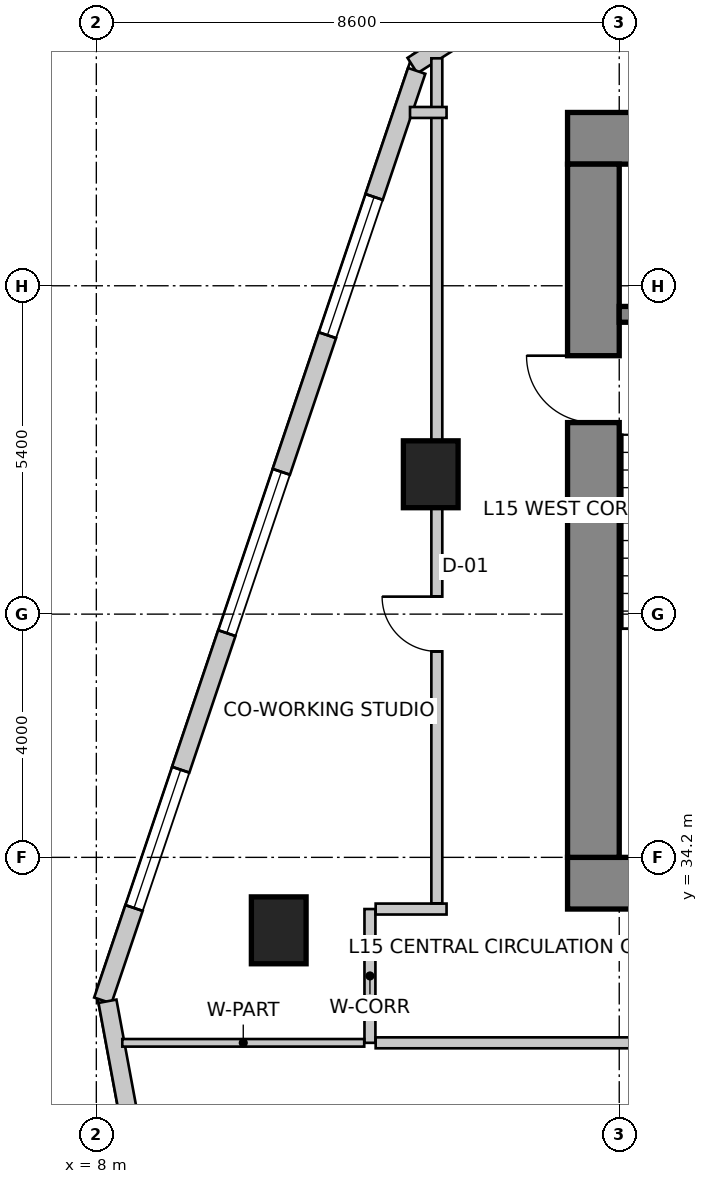
"""IFC4 building model, lengths in metres.
Left out: names, types, materials, properties, quantities, classifications, styles, units other than length and angle.
Written with IfcOpenShell. Run it as: python <this file> out.ifc"""

import sys

from ifc_helpers import new_model, si_unit, direction, frame, frame_2d, origin, origin_2d, place, context, subcontext, project, spatial, rectangle, extrude, source, transform, mapped, element, fill, save


model = new_model("IFC4")
c1 = context("Model", 3, precision=1e-05, world=origin(), true_north=direction((0.0, 1.0)))
c2 = subcontext(c1, "Body", "Model", "MODEL_VIEW")
j1 = project(units=[si_unit("LENGTHUNIT", "METRE"), si_unit("PLANEANGLEUNIT", "RADIAN")], contexts=[c1])
p1 = place(None, origin())
s1 = spatial("IfcSite", under=j1, at=p1, CompositionType="ELEMENT")
p2 = place(p1, origin())
s2 = spatial("IfcBuilding", under=s1, at=p2, CompositionType="ELEMENT")
p3 = place(p2, frame((0.0, 0.0, 63.0)))
s3 = spatial("IfcBuildingStorey", under=s2, at=p3, CompositionType="ELEMENT", Elevation=63.0)
p4 = place(p3, frame((15.75, 46.025, 0.0), z_axis=(0.0, 0.0, 1.0), x_axis=(1.0, 0.0, 0.0)))
e1 = element("IfcWall", 1, at=p4, inside=s3, PredefinedType="SHEAR", context=c2, shape_type="SweptSolid", body=[
    extrude(rectangle(XDim=16.1, YDim=0.85, at=frame_2d((8.05, 0.0))), origin(), (0.0, 0.0, 1.0), 4.0),
])
p5 = place(p3, frame((15.75, 33.775, 0.0), z_axis=(0.0, 0.0, 1.0), x_axis=(1.0, 0.0, 0.0)))
e2 = element("IfcWall", 2, at=p5, inside=s3, PredefinedType="SHEAR", context=c2, shape_type="SweptSolid", body=[
    extrude(rectangle(XDim=16.1, YDim=0.85, at=frame_2d((8.05, 0.0))), origin(), (0.0, 0.0, 1.0), 4.0),
])
m1 = source(origin(), c2, "Body", "SweptSolid", [
    extrude(rectangle(XDim=1.3, YDim=2.15, at=frame_2d((0.65, 1.075))), frame((0.0, 0.435, 0.0), z_axis=(0.0, -1.0, 0.0), x_axis=(1.0, 0.0, 0.0)), (0.0, 0.0, 1.0), 0.87),
])
p6 = place(p5, frame((10.18, 0.0, 0.0)))
e3 = element("IfcOpeningElement", 3, at=p6, cuts=e2, PredefinedType="OPENING", context=c2, shape_type="MappedRepresentation", body=[
    mapped(m1, transform((0.0, 0.0, 0.0), scale=1.0)),
])
p7 = place(p3, frame((16.175, 34.2, 0.0), z_axis=(0.0, 0.0, 1.0), x_axis=(0.0, 1.0, 0.0)))
e4 = element("IfcWall", 4, at=p7, inside=s3, PredefinedType="SHEAR", context=c2, shape_type="SweptSolid", body=[
    extrude(rectangle(XDim=11.4, YDim=0.85, at=frame_2d((5.7, 0.0))), origin(), (0.0, 0.0, 1.0), 4.0),
])
m2 = source(origin(), c2, "Body", "SweptSolid", [
    extrude(rectangle(XDim=1.1, YDim=2.15, at=frame_2d((0.55, 1.075))), frame((0.0, 0.435, 0.0), z_axis=(0.0, -1.0, 0.0), x_axis=(1.0, 0.0, 0.0)), (0.0, 0.0, 1.0), 0.87),
])
p8 = place(p7, frame((7.15, 0.0, 0.0)))
e5 = element("IfcOpeningElement", 5, at=p8, cuts=e4, PredefinedType="OPENING", context=c2, shape_type="MappedRepresentation", body=[
    mapped(m2, transform((0.0, 0.0, 0.0), scale=1.0)),
])
p9 = place(p3, frame((16.6, 43.13, 0.0), z_axis=(0.0, 0.0, 1.0), x_axis=(1.0, 0.0, 0.0)))
e6 = element("IfcWall", 6, at=p9, inside=s3, PredefinedType="SHEAR", context=c2, shape_type="SweptSolid", body=[
    extrude(rectangle(XDim=3.5, YDim=0.26, at=frame_2d((1.75, 0.0))), origin(), (0.0, 0.0, 1.0), 4.0),
])
m3 = source(origin(), c2, "Body", "SweptSolid", [
    extrude(rectangle(XDim=0.9, YDim=1.1, at=origin_2d()), origin(), (0.0, 0.0, 1.0), 4.0),
])
for number, where, z_axis, x_axis in (
    (7, (11.0, 33.0, 0.0), (0.0, 0.0, 1.0), (1.0, 0.0, 0.0)),
    (8, (13.5, 40.5, 0.0), (0.0, 0.0, 1.0), (1.0, 0.0, 0.0)),
):
    element("IfcColumn", number, at=place(p3, frame(where, z_axis=z_axis, x_axis=x_axis)), inside=s3, PredefinedType="COLUMN", context=c2, shape_type="MappedRepresentation", body=[
        mapped(m3, transform((0.0, 0.0, 0.0), scale=1.0)),
    ])
p10 = place(p3, frame((21.875, 52.742, 0.0), z_axis=(0.0, 0.0, 1.0), x_axis=(-0.843662465249, -0.536873956092, 0.0)))
e9 = element("IfcWall", 9, at=p10, inside=s3, PredefinedType="SOLIDWALL", context=c2, shape_type="SweptSolid", body=[
    extrude(rectangle(XDim=10.284, YDim=0.3, at=frame_2d((5.142, 0.0))), origin(), (0.0, 0.0, 1.0), 3.75),
])
m4 = source(origin(), c2, "Body", "SweptSolid", [
    extrude(rectangle(XDim=1.2, YDim=1.6, at=frame_2d((0.6, 0.8))), frame((0.0, 0.16, 0.0), z_axis=(0.0, -1.0, 0.0), x_axis=(1.0, 0.0, 0.0)), (0.0, 0.0, 1.0), 0.32),
])
p11 = place(p10, frame((0.479, 0.0, 0.85)))
e10 = element("IfcOpeningElement", 10, at=p11, cuts=e9, PredefinedType="OPENING", context=c2, shape_type="MappedRepresentation", body=[
    mapped(m4, transform((0.0, 0.0, 0.0), scale=1.0)),
])
m5 = source(origin(), c2, "Body", "SweptSolid", [
    extrude(rectangle(XDim=2.8, YDim=2.4, at=frame_2d((1.4, 1.2))), frame((0.0, 0.16, 0.0), z_axis=(0.0, -1.0, 0.0), x_axis=(1.0, 0.0, 0.0)), (0.0, 0.0, 1.0), 0.32),
])
p12 = place(p10, frame((3.342, 0.0, 0.85)))
e11 = element("IfcOpeningElement", 11, at=p12, cuts=e9, PredefinedType="OPENING", context=c2, shape_type="MappedRepresentation", body=[
    mapped(m5, transform((0.0, 0.0, 0.0), scale=1.0)),
])
m6 = source(origin(), c2, "Body", "SweptSolid", [
    extrude(rectangle(XDim=1.8, YDim=2.1, at=frame_2d((0.9, 1.05))), frame((0.0, 0.16, 0.0), z_axis=(0.0, -1.0, 0.0), x_axis=(1.0, 0.0, 0.0)), (0.0, 0.0, 1.0), 0.32),
])
p13 = place(p10, frame((7.753, 0.0, 0.85)))
e12 = element("IfcOpeningElement", 12, at=p13, cuts=e9, PredefinedType="OPENING", context=c2, shape_type="MappedRepresentation", body=[
    mapped(m6, transform((0.0, 0.0, 0.0), scale=1.0)),
])
p14 = place(p3, frame((13.269, 47.134, 0.0), z_axis=(0.0, 0.0, 1.0), x_axis=(-0.319920423265, -0.947444416722, 0.0)))
e13 = element("IfcWall", 13, at=p14, inside=s3, PredefinedType="SOLIDWALL", context=c2, shape_type="SweptSolid", body=[
    extrude(rectangle(XDim=16.135, YDim=0.3, at=frame_2d((8.067, 0.0))), origin(), (0.0, 0.0, 1.0), 3.75),
])
m7 = source(origin(), c2, "Body", "SweptSolid", [
    extrude(rectangle(XDim=2.4, YDim=2.2, at=frame_2d((1.2, 1.1))), frame((0.0, 0.16, 0.0), z_axis=(0.0, -1.0, 0.0), x_axis=(1.0, 0.0, 0.0)), (0.0, 0.0, 1.0), 0.32),
])
p15 = place(p14, frame((2.188, 0.0, 0.85)))
e14 = element("IfcOpeningElement", 14, at=p15, cuts=e13, PredefinedType="OPENING", context=c2, shape_type="MappedRepresentation", body=[
    mapped(m7, transform((0.0, 0.0, 0.0), scale=1.0)),
])
p16 = place(p14, frame((6.959, 0.0, 0.85)))
e15 = element("IfcOpeningElement", 15, at=p16, cuts=e13, PredefinedType="OPENING", context=c2, shape_type="MappedRepresentation", body=[
    mapped(m5, transform((0.0, 0.0, 0.0), scale=1.0)),
])
p17 = place(p14, frame((12.13, 0.0, 0.85)))
e16 = element("IfcOpeningElement", 16, at=p17, cuts=e13, PredefinedType="OPENING", context=c2, shape_type="MappedRepresentation", body=[
    mapped(m7, transform((0.0, 0.0, 0.0), scale=1.0)),
])
p18 = place(p3, frame((8.183, 31.833, 0.0), z_axis=(0.0, 0.0, 1.0), x_axis=(0.18216364648, -0.983268226834, 0.0)))
e17 = element("IfcWall", 17, at=p18, inside=s3, PredefinedType="SOLIDWALL", context=c2, shape_type="SweptSolid", body=[
    extrude(rectangle(XDim=26.678, YDim=0.3, at=frame_2d((13.339, 0.0))), origin(), (0.0, 0.0, 1.0), 3.75),
])
m8 = source(origin(), c2, "Body", "SweptSolid", [
    extrude(rectangle(XDim=1.6, YDim=2.15, at=frame_2d((0.8, 1.075))), frame((0.0, 0.16, 0.0), z_axis=(0.0, -1.0, 0.0), x_axis=(1.0, 0.0, 0.0)), (0.0, 0.0, 1.0), 0.32),
])
p19 = place(p18, frame((9.427, 0.0, 0.0)))
e18 = element("IfcOpeningElement", 18, at=p19, cuts=e17, PredefinedType="OPENING", context=c2, shape_type="MappedRepresentation", body=[
    mapped(m8, transform((0.0, 0.0, 0.0), scale=1.0)),
])
p20 = place(p18, frame((3.642, 0.0, 0.85)))
e19 = element("IfcOpeningElement", 19, at=p20, cuts=e17, PredefinedType="OPENING", context=c2, shape_type="MappedRepresentation", body=[
    mapped(m5, transform((0.0, 0.0, 0.0), scale=1.0)),
])
p21 = place(p18, frame((13.647, 0.0, 0.85)))
e20 = element("IfcOpeningElement", 20, at=p21, cuts=e17, PredefinedType="OPENING", context=c2, shape_type="MappedRepresentation", body=[
    mapped(m5, transform((0.0, 0.0, 0.0), scale=1.0)),
])
p22 = place(p18, frame((18.372, 0.0, 0.85)))
e21 = element("IfcOpeningElement", 21, at=p22, cuts=e17, PredefinedType="OPENING", context=c2, shape_type="MappedRepresentation", body=[
    mapped(m7, transform((0.0, 0.0, 0.0), scale=1.0)),
])
p23 = place(p18, frame((22.696, 0.0, 0.85)))
e22 = element("IfcOpeningElement", 22, at=p23, cuts=e17, PredefinedType="OPENING", context=c2, shape_type="MappedRepresentation", body=[
    mapped(m5, transform((0.0, 0.0, 0.0), scale=1.0)),
])
p24 = place(p3, frame((12.5, 31.15, 0.0), z_axis=(0.0, 0.0, 1.0), x_axis=(0.0, 1.0, 0.0)))
e23 = element("IfcWall", 23, at=p24, inside=s3, PredefinedType="PARTITIONING", context=c2, shape_type="SweptSolid", body=[
    extrude(rectangle(XDim=2.2, YDim=0.18, at=frame_2d((1.1, 0.0))), origin(), (0.0, 0.0, 1.0), 3.335),
])
p25 = place(p3, frame((12.594, 33.35, 0.0), z_axis=(0.0, 0.0, 1.0), x_axis=(1.0, 0.0, 0.0)))
e24 = element("IfcWall", 24, at=p25, inside=s3, PredefinedType="PARTITIONING", context=c2, shape_type="SweptSolid", body=[
    extrude(rectangle(XDim=1.166, YDim=0.18, at=frame_2d((0.583, 0.0))), origin(), (0.0, 0.0, 1.0), 3.75),
])
p26 = place(p3, frame((26.76, 31.15, 0.0), z_axis=(0.0, 0.0, 1.0), x_axis=(-1.0, 0.0, 0.0)))
e25 = element("IfcWall", 25, at=p26, inside=s3, PredefinedType="PARTITIONING", context=c2, shape_type="SweptSolid", body=[
    extrude(rectangle(XDim=14.166, YDim=0.18, at=frame_2d((7.083, 0.0))), origin(), (0.0, 0.0, 1.0), 3.335),
])
m9 = source(origin(), c2, "Body", "SweptSolid", [
    extrude(rectangle(XDim=1.4, YDim=2.15, at=frame_2d((0.7, 1.075))), frame((0.0, 0.1, 0.0), z_axis=(0.0, -1.0, 0.0), x_axis=(1.0, 0.0, 0.0)), (0.0, 0.0, 1.0), 0.2),
])
p27 = place(p26, frame((6.323, 0.0, 0.0)))
e26 = element("IfcOpeningElement", 26, at=p27, cuts=e25, PredefinedType="OPENING", context=c2, shape_type="MappedRepresentation", body=[
    mapped(m9, transform((0.0, 0.0, 0.0), scale=1.0)),
])
p28 = place(p3, frame((13.6, 33.444, 0.0), z_axis=(0.0, 0.0, 1.0), x_axis=(0.0, 1.0, 0.0)))
e27 = element("IfcWall", 27, at=p28, inside=s3, PredefinedType="PARTITIONING", context=c2, shape_type="SweptSolid", body=[
    extrude(rectangle(XDim=13.896, YDim=0.18, at=frame_2d((6.948, 0.0))), origin(), (0.0, 0.0, 1.0), 2.892),
])
m10 = source(origin(), c2, "Body", "SweptSolid", [
    extrude(rectangle(XDim=0.9, YDim=2.15, at=frame_2d((0.45, 1.075))), frame((0.0, 0.1, 0.0), z_axis=(0.0, -1.0, 0.0), x_axis=(1.0, 0.0, 0.0)), (0.0, 0.0, 1.0), 0.2),
])
p29 = place(p28, frame((4.144, 0.0, 0.0)))
e28 = element("IfcOpeningElement", 28, at=p29, cuts=e27, PredefinedType="OPENING", context=c2, shape_type="MappedRepresentation", body=[
    mapped(m10, transform((0.0, 0.0, 0.0), scale=1.0)),
])
p30 = place(p3, frame((13.76, 46.45, 0.0), z_axis=(0.0, 0.0, 1.0), x_axis=(-1.0, 0.0, 0.0)))
e29 = element("IfcWall", 29, at=p30, inside=s3, PredefinedType="PARTITIONING", context=c2, shape_type="SweptSolid", body=[
    extrude(rectangle(XDim=0.601, YDim=0.18, at=frame_2d((0.301, 0.0))), origin(), (0.0, 0.0, 1.0), 3.75),
])
p31 = place(p3, frame((12.406, 31.15, 0.0), z_axis=(0.0, 0.0, 1.0), x_axis=(-1.0, 0.0, 0.0)))
e30 = element("IfcWall", 30, at=p31, inside=s3, PredefinedType="PARTITIONING", context=c2, shape_type="SweptSolid", body=[
    extrude(rectangle(XDim=3.979, YDim=0.125, at=frame_2d((1.99, 0.0))), origin(), (0.0, 0.0, 1.0), 2.892),
])
m11 = source(origin(), c2, "Body", "SweptSolid", [
    extrude(rectangle(XDim=2.4, YDim=2.2, at=frame_2d((1.2, 1.1))), frame((0.0, -0.015, 0.0), z_axis=(0.0, -1.0, 0.0), x_axis=(1.0, 0.0, 0.0)), (0.0, 0.0, 1.0), 0.06),
])
p32 = place(p15, origin())
e31 = element("IfcWindow", 31, at=p32, inside=s3, PartitioningType="SINGLE_PANEL", PredefinedType="WINDOW", context=c2, shape_type="MappedRepresentation", body=[
    mapped(m11, transform((0.0, 0.0, 0.0), scale=1.0)),
])
fill(e14, e31)
m12 = source(origin(), c2, "Body", "SweptSolid", [
    extrude(rectangle(XDim=2.8, YDim=2.4, at=frame_2d((1.4, 1.2))), frame((0.0, -0.015, 0.0), z_axis=(0.0, -1.0, 0.0), x_axis=(1.0, 0.0, 0.0)), (0.0, 0.0, 1.0), 0.06),
])
p33 = place(p16, origin())
e32 = element("IfcWindow", 32, at=p33, inside=s3, PartitioningType="SINGLE_PANEL", PredefinedType="WINDOW", context=c2, shape_type="MappedRepresentation", body=[
    mapped(m12, transform((0.0, 0.0, 0.0), scale=1.0)),
])
fill(e15, e32)
p34 = place(p17, origin())
e33 = element("IfcWindow", 33, at=p34, inside=s3, PartitioningType="SINGLE_PANEL", PredefinedType="WINDOW", context=c2, shape_type="MappedRepresentation", body=[
    mapped(m11, transform((0.0, 0.0, 0.0), scale=1.0)),
])
fill(e16, e33)
m13 = source(origin(), c2, "Body", "SweptSolid", [
    extrude(rectangle(XDim=1.1, YDim=2.15, at=frame_2d((0.55, 1.075))), frame((0.0, 0.025, 0.0), z_axis=(0.0, -1.0, 0.0), x_axis=(1.0, 0.0, 0.0)), (0.0, 0.0, 1.0), 0.05),
])
p35 = place(p8, origin())
e34 = element("IfcDoor", 34, at=p35, inside=s3, OperationType="SINGLE_SWING_RIGHT", PredefinedType="DOOR", context=c2, shape_type="MappedRepresentation", body=[
    mapped(m13, transform((0.0, 0.0, 0.0), scale=1.0)),
])
fill(e5, e34)
m14 = source(origin(), c2, "Body", "SweptSolid", [
    extrude(rectangle(XDim=0.9, YDim=2.15, at=frame_2d((0.45, 1.075))), frame((0.0, 0.025, 0.0), z_axis=(0.0, -1.0, 0.0), x_axis=(1.0, 0.0, 0.0)), (0.0, 0.0, 1.0), 0.05),
])
p36 = place(p29, origin())
e35 = element("IfcDoor", 35, at=p36, inside=s3, OperationType="SINGLE_SWING_RIGHT", PredefinedType="DOOR", context=c2, shape_type="MappedRepresentation", body=[
    mapped(m14, transform((0.0, 0.0, 0.0), scale=1.0)),
])
fill(e28, e35)
save(model, sys.argv[1])
